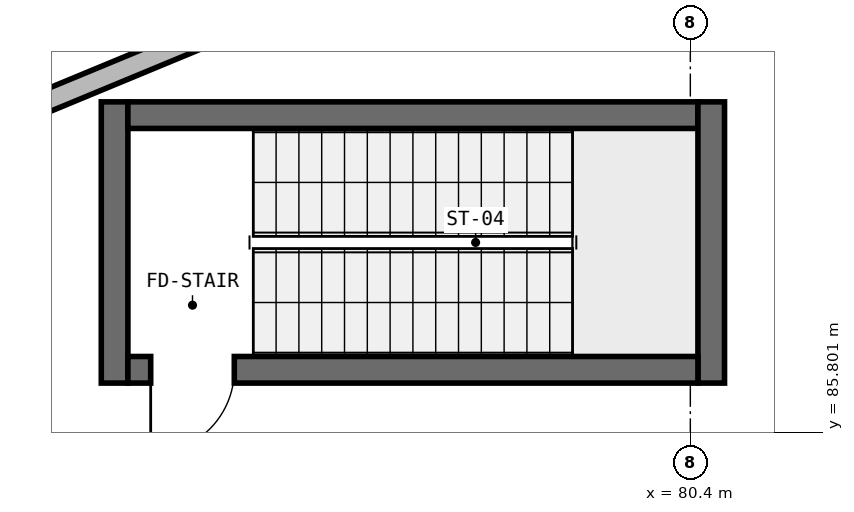
"""IFC4 building model, lengths in metres.
Left out: names, types, materials, properties, quantities, classifications, styles, units other than length and angle.
Written with IfcOpenShell. Run it as: python <this file> out.ifc"""

import sys

from ifc_helpers import new_model, si_unit, direction, frame, frame_2d, origin, place, context, subcontext, project, spatial, rectangle, extrude, element, fill, save


model = new_model("IFC4")
c1 = context("Model", 3, precision=1e-05, world=origin(), true_north=direction((0.0, 1.0)))
c2 = subcontext(c1, "Body", "Model", "MODEL_VIEW")
j1 = project(units=[si_unit("LENGTHUNIT", "METRE"), si_unit("PLANEANGLEUNIT", "RADIAN")], contexts=[c1])
p1 = place(None, origin())
s1 = spatial("IfcSite", under=j1, at=p1, CompositionType="ELEMENT")
p2 = place(p1, origin())
s2 = spatial("IfcBuilding", under=s1, at=p2, CompositionType="ELEMENT")
p3 = place(p2, origin())
s3 = spatial("IfcBuildingStorey", under=s2, at=p3, CompositionType="ELEMENT", Elevation=0.0)
p4 = place(p3, frame((72.825, 86.45, 0.0), z_axis=(0.0, 0.0, 1.0), x_axis=(0.0, 1.0, 0.0)))
e1 = element("IfcWall", 1, at=p4, inside=s3, PredefinedType="SHEAR", context=c2, shape_type="SweptSolid", body=[
    extrude(rectangle(XDim=3.7, YDim=0.35, at=frame_2d((1.85, 0.0))), origin(), (0.0, 0.0, 1.0), 5.25),
])
p5 = place(p3, frame((73.0, 89.975, 0.0), z_axis=(0.0, 0.0, 1.0), x_axis=(1.0, 0.0, 0.0)))
e2 = element("IfcWall", 2, at=p5, inside=s3, PredefinedType="SHEAR", context=c2, shape_type="SweptSolid", body=[
    extrude(rectangle(XDim=7.5, YDim=0.35, at=frame_2d((3.75, 0.0))), origin(), (0.0, 0.0, 1.0), 5.25),
])
p6 = place(p3, frame((80.675, 90.15, 0.0), z_axis=(0.0, 0.0, 1.0), x_axis=(0.0, -1.0, 0.0)))
e3 = element("IfcWall", 3, at=p6, inside=s3, PredefinedType="SHEAR", context=c2, shape_type="SweptSolid", body=[
    extrude(rectangle(XDim=3.7, YDim=0.35, at=frame_2d((1.85, 0.0))), origin(), (0.0, 0.0, 1.0), 5.25),
])
p7 = place(p3, frame((80.5, 86.625, 0.0), z_axis=(0.0, 0.0, 1.0), x_axis=(-1.0, 0.0, 0.0)))
e4 = element("IfcWall", 4, at=p7, inside=s3, PredefinedType="SHEAR", context=c2, shape_type="SweptSolid", body=[
    extrude(rectangle(XDim=7.5, YDim=0.35, at=frame_2d((3.75, 0.0))), origin(), (0.0, 0.0, 1.0), 5.25),
])
p8 = place(p7, frame((6.1, 0.0, 0.0)))
e5 = element("IfcOpeningElement", 5, at=p8, cuts=e4, PredefinedType="OPENING", context=c2, shape_type="SweptSolid", body=[
    extrude(rectangle(XDim=1.1, YDim=2.15, at=frame_2d((0.55, 1.075))), frame((0.0, 0.185, 0.0), z_axis=(0.0, -1.0, 0.0), x_axis=(1.0, 0.0, 0.0)), (0.0, 0.0, 1.0), 0.37),
])
p9 = place(p3, frame((76.988, 93.341, 0.0), z_axis=(0.0, 0.0, 1.0), x_axis=(-0.92385889973, -0.382733240508, 0.0)))
e6 = element("IfcWall", 6, at=p9, inside=s3, PredefinedType="SOLIDWALL", context=c2, shape_type="SweptSolid", body=[
    extrude(rectangle(XDim=10.081, YDim=0.29, at=frame_2d((5.04, 0.0))), origin(), (0.0, 0.0, 1.0), 5.07),
])
p10 = place(p9, frame((3.69, 0.0, 0.95)))
e7 = element("IfcOpeningElement", 7, at=p10, cuts=e6, PredefinedType="OPENING", context=c2, shape_type="SweptSolid", body=[
    extrude(rectangle(XDim=2.7, YDim=1.67, at=frame_2d((1.35, 0.835))), frame((0.0, 0.155, 0.0), z_axis=(0.0, -1.0, 0.0), x_axis=(1.0, 0.0, 0.0)), (0.0, 0.0, 1.0), 0.31),
])
p11 = place(p3, frame((68.179, 88.607, 0.0), z_axis=(0.0, 0.0, 1.0), x_axis=(0.923848052238, 0.382759423628, 0.0)))
e8 = element("IfcWall", 8, at=p11, inside=s3, PredefinedType="SOLIDWALL", context=c2, shape_type="SweptSolid", body=[
    extrude(rectangle(XDim=9.821, YDim=0.29, at=frame_2d((4.91, 0.0))), origin(), (0.0, 0.0, 1.0), 5.07),
])
p12 = place(p11, frame((1.27, 0.0, 0.95)))
e9 = element("IfcOpeningElement", 9, at=p12, cuts=e8, PredefinedType="OPENING", context=c2, shape_type="SweptSolid", body=[
    extrude(rectangle(XDim=2.37, YDim=1.8, at=frame_2d((1.185, 0.9))), frame((0.0, 0.155, 0.0), z_axis=(0.0, -1.0, 0.0), x_axis=(1.0, 0.0, 0.0)), (0.0, 0.0, 1.0), 0.31),
])
p13 = place(p11, frame((6.181, 0.0, 0.95)))
e10 = element("IfcOpeningElement", 10, at=p13, cuts=e8, PredefinedType="OPENING", context=c2, shape_type="SweptSolid", body=[
    extrude(rectangle(XDim=2.37, YDim=1.8, at=frame_2d((1.185, 0.9))), frame((0.0, 0.155, 0.0), z_axis=(0.0, -1.0, 0.0), x_axis=(1.0, 0.0, 0.0)), (0.0, 0.0, 1.0), 0.31),
])
p14 = place(p3, frame((72.3, 81.461, 0.0), z_axis=(0.0, 0.0, 1.0), x_axis=(-0.499973530083, 0.866040685659, 0.0)))
e11 = element("IfcWall", 11, at=p14, inside=s3, PredefinedType="PARTITIONING", context=c2, shape_type="SweptSolid", body=[
    extrude(rectangle(XDim=8.081, YDim=0.15, at=frame_2d((4.04, 0.0))), origin(), (0.0, 0.0, 1.0), 4.598),
])
p15 = place(p8, origin())
e12 = element("IfcDoor", 12, at=p15, inside=s3, OperationType="SINGLE_SWING_RIGHT", PredefinedType="DOOR", context=c2, shape_type="SweptSolid", body=[
    extrude(rectangle(XDim=1.1, YDim=2.15, at=frame_2d((0.55, 1.075))), frame((0.0, 0.025, 0.0), z_axis=(0.0, -1.0, 0.0), x_axis=(1.0, 0.0, 0.0)), (0.0, 0.0, 1.0), 0.05),
])
fill(e5, e12)
save(model, sys.argv[1])
